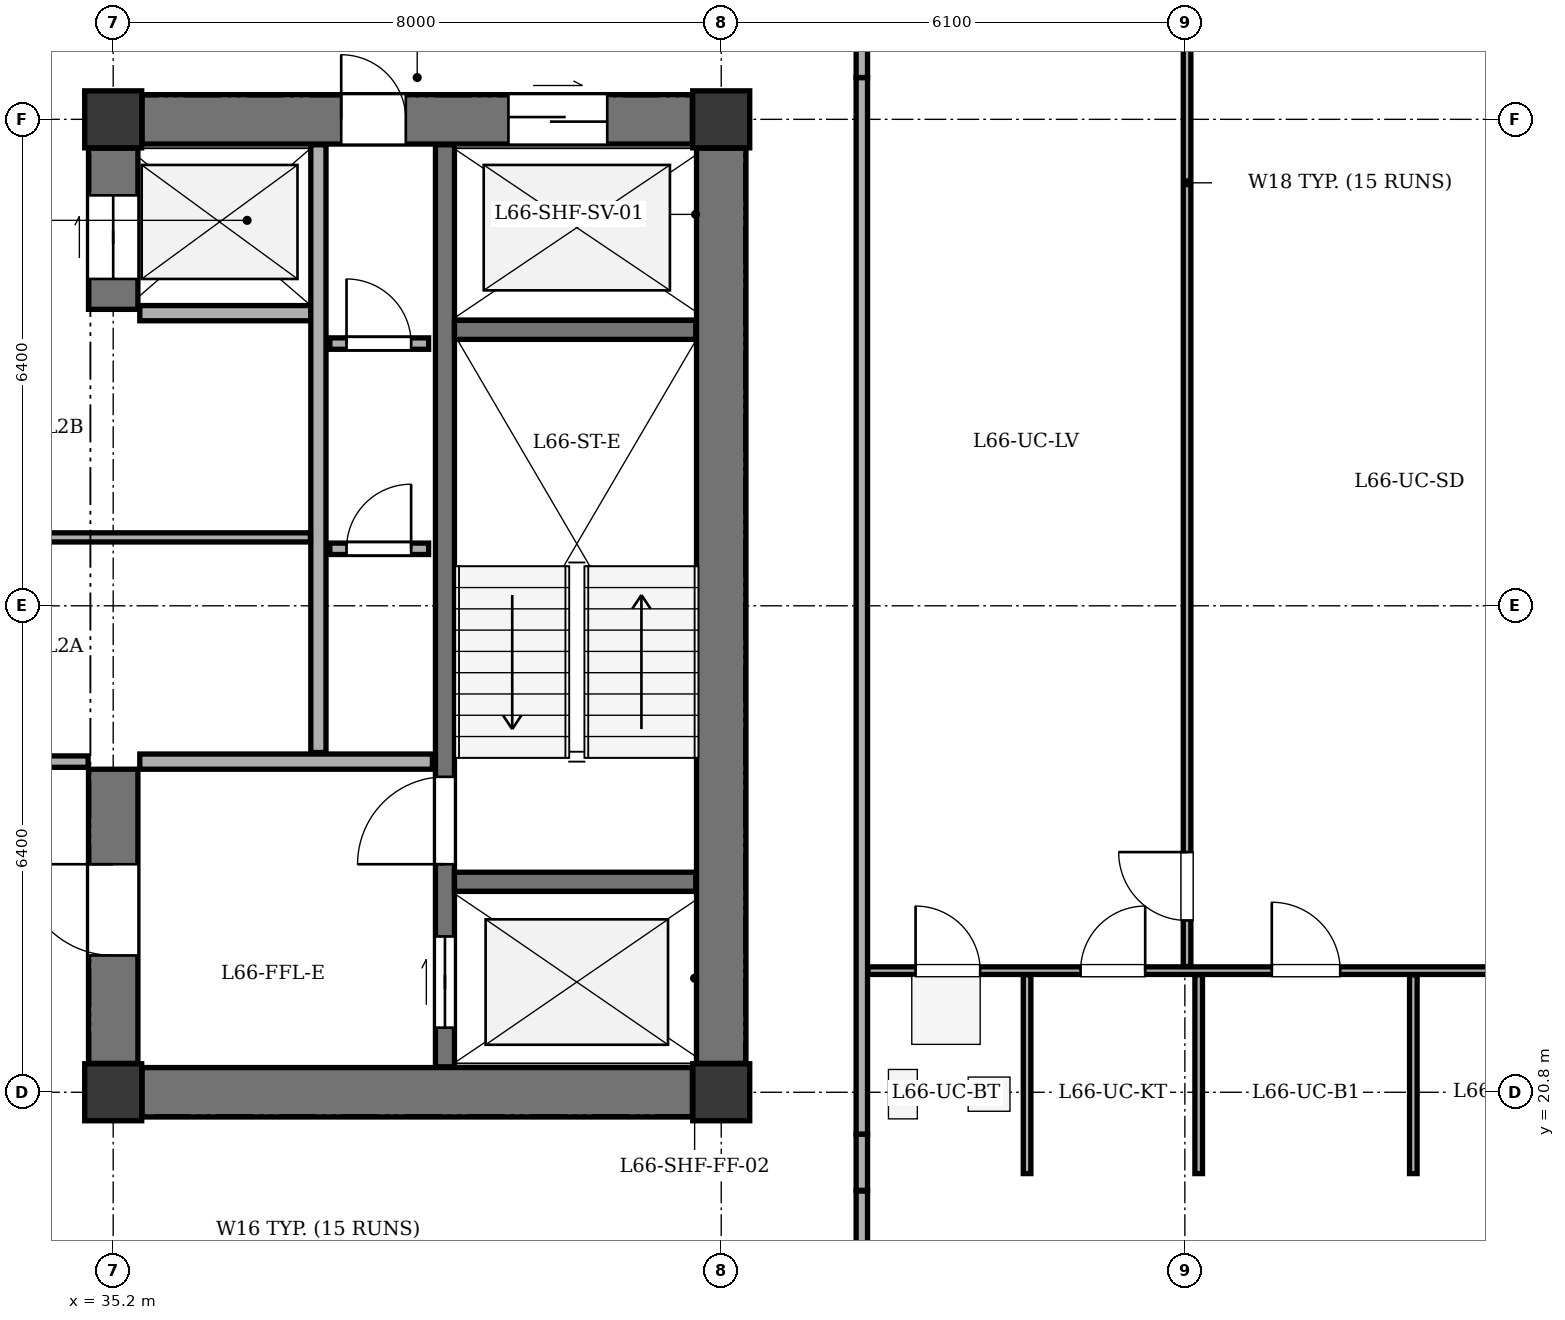
"""IFC4 building model, lengths in metres.
Left out: names, types, materials, properties, quantities, classifications, styles, units other than length and angle.
Written with IfcOpenShell. Run it as: python <this file> out.ifc"""

import sys

from ifc_helpers import new_model, si_unit, direction, frame, frame_2d, origin, origin_2d, place, context, subcontext, project, spatial, rectangle, extrude, element, fill, save


model = new_model("IFC4")
c1 = context("Model", 3, precision=1e-05, world=origin(), true_north=direction((0.0, 1.0)))
c2 = subcontext(c1, "Body", "Model", "MODEL_VIEW")
j1 = project(units=[si_unit("LENGTHUNIT", "METRE"), si_unit("PLANEANGLEUNIT", "RADIAN")], contexts=[c1])
p1 = place(None, origin())
s1 = spatial("IfcSite", under=j1, at=p1, CompositionType="ELEMENT")
p2 = place(p1, origin())
s2 = spatial("IfcBuilding", under=s1, at=p2, CompositionType="ELEMENT")
p3 = place(p2, frame((0.0, 0.0, 251.7)))
s3 = spatial("IfcBuildingStorey", under=s2, at=p3, CompositionType="ELEMENT", Elevation=251.7)
for number, where, z_axis, x_axis in (
    (1, (35.2, 20.8, 0.0), (0.0, 0.0, 1.0), (1.0, 0.0, 0.0)),
    (2, (43.2, 20.8, 0.0), (0.0, 0.0, 1.0), (1.0, 0.0, 0.0)),
    (3, (35.2, 33.6, 0.0), (0.0, 0.0, 1.0), (1.0, 0.0, 0.0)),
    (4, (43.2, 33.6, 0.0), (0.0, 0.0, 1.0), (1.0, 0.0, 0.0)),
):
    element("IfcColumn", number, at=place(p3, frame(where, z_axis=z_axis, x_axis=x_axis)), inside=s3, PredefinedType="COLUMN", context=c2, shape_type="SweptSolid", body=[
        extrude(rectangle(XDim=0.75, YDim=0.75, at=origin_2d()), origin(), (0.0, 0.0, 1.0), 3.4),
    ])
p4 = place(p3, frame((55.52, 19.85, 0.0), z_axis=(0.0, 0.0, 1.0), x_axis=(-0.707106781187, -0.707106781187, 0.0)))
e5 = element("IfcWall", 5, at=p4, inside=s3, PredefinedType="STANDARD", context=c2, shape_type="SweptSolid", body=[
    extrude(rectangle(XDim=5.402, YDim=0.32, at=frame_2d((2.701, 0.0))), origin(), (0.0, 0.0, 1.0), 2.725),
])
p5 = place(p4, frame((2.001, 0.0, 0.75)))
e6 = element("IfcOpeningElement", 6, at=p5, cuts=e5, PredefinedType="OPENING", context=c2, shape_type="SweptSolid", body=[
    extrude(rectangle(XDim=1.4, YDim=1.65, at=frame_2d((0.7, 0.825))), frame((0.0, 0.17, 0.0), z_axis=(0.0, -1.0, 0.0), x_axis=(1.0, 0.0, 0.0)), (0.0, 0.0, 1.0), 0.34),
])
p6 = place(p3, frame((43.2, 21.18, 0.0), z_axis=(0.0, 0.0, 1.0), x_axis=(0.0, 1.0, 0.0)))
e7 = element("IfcWall", 7, at=p6, inside=s3, PredefinedType="SHEAR", context=c2, shape_type="SweptSolid", body=[
    extrude(rectangle(XDim=12.04, YDim=0.65, at=frame_2d((6.02, 0.0))), origin(), (0.0, 0.0, 1.0), 3.1),
])
p7 = place(p3, frame((35.58, 20.8, 0.0), z_axis=(0.0, 0.0, 1.0), x_axis=(1.0, 0.0, 0.0)))
e8 = element("IfcWall", 8, at=p7, inside=s3, PredefinedType="SHEAR", context=c2, shape_type="SweptSolid", body=[
    extrude(rectangle(XDim=7.24, YDim=0.65, at=frame_2d((3.62, 0.0))), origin(), (0.0, 0.0, 1.0), 3.1),
])
p8 = place(p3, frame((35.58, 33.6, 0.0), z_axis=(0.0, 0.0, 1.0), x_axis=(1.0, 0.0, 0.0)))
e9 = element("IfcWall", 9, at=p8, inside=s3, PredefinedType="SHEAR", context=c2, shape_type="SweptSolid", body=[
    extrude(rectangle(XDim=7.24, YDim=0.65, at=frame_2d((3.62, 0.0))), origin(), (0.0, 0.0, 1.0), 3.1),
])
p9 = place(p8, frame((4.82, 0.0, 0.0)))
e10 = element("IfcOpeningElement", 10, at=p9, cuts=e9, PredefinedType="OPENING", context=c2, shape_type="SweptSolid", body=[
    extrude(rectangle(XDim=1.3, YDim=2.15, at=frame_2d((0.65, 1.075))), frame((0.0, 0.335, 0.0), z_axis=(0.0, -1.0, 0.0), x_axis=(1.0, 0.0, 0.0)), (0.0, 0.0, 1.0), 0.67),
])
p10 = place(p8, frame((2.62, 0.0, 0.0)))
e11 = element("IfcOpeningElement", 11, at=p10, cuts=e9, PredefinedType="OPENING", context=c2, shape_type="SweptSolid", body=[
    extrude(rectangle(XDim=0.85, YDim=2.02, at=frame_2d((0.425, 1.01))), frame((0.0, 0.335, 0.0), z_axis=(0.0, -1.0, 0.0), x_axis=(1.0, 0.0, 0.0)), (0.0, 0.0, 1.0), 0.67),
])
p11 = place(p3, frame((35.2, 21.18, 0.0), z_axis=(0.0, 0.0, 1.0), x_axis=(0.0, 1.0, 0.0)))
e12 = element("IfcWall", 12, at=p11, inside=s3, PredefinedType="SHEAR", context=c2, shape_type="SweptSolid", body=[
    extrude(rectangle(XDim=3.87, YDim=0.65, at=frame_2d((1.935, 0.0))), origin(), (0.0, 0.0, 1.0), 3.1),
])
p12 = place(p11, frame((1.42, 0.0, 0.0)))
e13 = element("IfcOpeningElement", 13, at=p12, cuts=e12, PredefinedType="OPENING", context=c2, shape_type="SweptSolid", body=[
    extrude(rectangle(XDim=1.2, YDim=2.15, at=frame_2d((0.6, 1.075))), frame((0.0, 0.335, 0.0), z_axis=(0.0, -1.0, 0.0), x_axis=(1.0, 0.0, 0.0)), (0.0, 0.0, 1.0), 0.67),
])
p13 = place(p3, frame((35.2, 31.1, 0.0), z_axis=(0.0, 0.0, 1.0), x_axis=(0.0, 1.0, 0.0)))
e14 = element("IfcWall", 14, at=p13, inside=s3, PredefinedType="SHEAR", context=c2, shape_type="SweptSolid", body=[
    extrude(rectangle(XDim=2.12, YDim=0.65, at=frame_2d((1.06, 0.0))), origin(), (0.0, 0.0, 1.0), 3.1),
])
p14 = place(p13, frame((0.4, 0.0, 0.0)))
e15 = element("IfcOpeningElement", 15, at=p14, cuts=e14, PredefinedType="OPENING", context=c2, shape_type="SweptSolid", body=[
    extrude(rectangle(XDim=1.1, YDim=2.1, at=frame_2d((0.55, 1.05))), frame((0.0, 0.335, 0.0), z_axis=(0.0, -1.0, 0.0), x_axis=(1.0, 0.0, 0.0)), (0.0, 0.0, 1.0), 0.67),
])
p15 = place(p3, frame((39.565, 21.135, 0.0), z_axis=(0.0, 0.0, 1.0), x_axis=(0.0, 1.0, 0.0)))
e16 = element("IfcWall", 16, at=p15, inside=s3, PredefinedType="SHEAR", context=c2, shape_type="SweptSolid", body=[
    extrude(rectangle(XDim=12.13, YDim=0.25, at=frame_2d((6.065, 0.0))), origin(), (0.0, 0.0, 1.0), 3.1),
])
p16 = place(p15, frame((0.515, 0.0, 0.0)))
e17 = element("IfcOpeningElement", 17, at=p16, cuts=e16, PredefinedType="OPENING", context=c2, shape_type="SweptSolid", body=[
    extrude(rectangle(XDim=1.2, YDim=2.15, at=frame_2d((0.6, 1.075))), frame((0.0, 0.135, 0.0), z_axis=(0.0, -1.0, 0.0), x_axis=(1.0, 0.0, 0.0)), (0.0, 0.0, 1.0), 0.27),
])
p17 = place(p15, frame((2.665, 0.0, 0.0)))
e18 = element("IfcOpeningElement", 18, at=p17, cuts=e16, PredefinedType="OPENING", context=c2, shape_type="SweptSolid", body=[
    extrude(rectangle(XDim=1.15, YDim=2.15, at=frame_2d((0.575, 1.075))), frame((0.0, 0.135, 0.0), z_axis=(0.0, -1.0, 0.0), x_axis=(1.0, 0.0, 0.0)), (0.0, 0.0, 1.0), 0.27),
])
for number, where, z_axis, x_axis in (
    (19, (39.69, 23.57, 0.0), (0.0, 0.0, 1.0), (1.0, 0.0, 0.0)),
    (20, (39.69, 30.83, 0.0), (0.0, 0.0, 1.0), (1.0, 0.0, 0.0)),
):
    element("IfcWall", number, at=place(p3, frame(where, z_axis=z_axis, x_axis=x_axis)), inside=s3, PredefinedType="SHEAR", context=c2, shape_type="SweptSolid", body=[
        extrude(rectangle(XDim=3.175, YDim=0.25, at=frame_2d((1.587, 0.0))), origin(), (0.0, 0.0, 1.0), 3.1),
    ])
p18 = place(p3, frame((35.55, 25.15, 0.0), z_axis=(0.0, 0.0, 1.0), x_axis=(1.0, 0.0, 0.0)))
e21 = element("IfcWall", 21, at=p18, inside=s3, PredefinedType="SOLIDWALL", context=c2, shape_type="SweptSolid", body=[
    extrude(rectangle(XDim=3.85, YDim=0.2, at=frame_2d((1.925, 0.0))), origin(), (0.0, 0.0, 1.0), 3.1),
])
p19 = place(p3, frame((35.55, 31.05, 0.0), z_axis=(0.0, 0.0, 1.0), x_axis=(1.0, 0.0, 0.0)))
e22 = element("IfcWall", 22, at=p19, inside=s3, PredefinedType="SOLIDWALL", context=c2, shape_type="SweptSolid", body=[
    extrude(rectangle(XDim=2.25, YDim=0.2, at=frame_2d((1.125, 0.0))), origin(), (0.0, 0.0, 1.0), 3.1),
])
p20 = place(p3, frame((37.9, 25.27, 0.0), z_axis=(0.0, 0.0, 1.0), x_axis=(0.0, 1.0, 0.0)))
e23 = element("IfcWall", 23, at=p20, inside=s3, PredefinedType="SOLIDWALL", context=c2, shape_type="SweptSolid", body=[
    extrude(rectangle(XDim=7.995, YDim=0.2, at=frame_2d((3.998, 0.0))), origin(), (0.0, 0.0, 1.0), 3.1),
])
p21 = place(p3, frame((38.05, 27.95, 0.0), z_axis=(0.0, 0.0, 1.0), x_axis=(1.0, 0.0, 0.0)))
e24 = element("IfcWall", 24, at=p21, inside=s3, PredefinedType="PARTITIONING", context=c2, shape_type="SweptSolid", body=[
    extrude(rectangle(XDim=1.3, YDim=0.15, at=frame_2d((0.65, 0.0))), origin(), (0.0, 0.0, 1.0), 3.1),
])
p22 = place(p21, frame((0.22, 0.0, 0.0)))
e25 = element("IfcOpeningElement", 25, at=p22, cuts=e24, PredefinedType="OPENING", context=c2, shape_type="SweptSolid", body=[
    extrude(rectangle(XDim=0.85, YDim=2.02, at=frame_2d((0.425, 1.01))), frame((0.0, 0.085, 0.0), z_axis=(0.0, -1.0, 0.0), x_axis=(1.0, 0.0, 0.0)), (0.0, 0.0, 1.0), 0.17),
])
p23 = place(p3, frame((38.05, 30.65, 0.0), z_axis=(0.0, 0.0, 1.0), x_axis=(1.0, 0.0, 0.0)))
e26 = element("IfcWall", 26, at=p23, inside=s3, PredefinedType="PARTITIONING", context=c2, shape_type="SweptSolid", body=[
    extrude(rectangle(XDim=1.3, YDim=0.15, at=frame_2d((0.65, 0.0))), origin(), (0.0, 0.0, 1.0), 3.1),
])
p24 = place(p23, frame((0.22, 0.0, 0.0)))
e27 = element("IfcOpeningElement", 27, at=p24, cuts=e26, PredefinedType="OPENING", context=c2, shape_type="SweptSolid", body=[
    extrude(rectangle(XDim=0.85, YDim=2.02, at=frame_2d((0.425, 1.01))), frame((0.0, 0.085, 0.0), z_axis=(0.0, -1.0, 0.0), x_axis=(1.0, 0.0, 0.0)), (0.0, 0.0, 1.0), 0.17),
])
p25 = place(p3, frame((29.35, 25.15, 0.0), z_axis=(0.0, 0.0, 1.0), x_axis=(1.0, 0.0, 0.0)))
e28 = element("IfcWall", 28, at=p25, inside=s3, PredefinedType="PARTITIONING", context=c2, shape_type="SweptSolid", body=[
    extrude(rectangle(XDim=5.52, YDim=0.15, at=frame_2d((2.76, 0.0))), origin(), (0.0, 0.0, 1.0), 3.1),
])
p26 = place(p3, frame((29.45, 28.1, 0.0), z_axis=(0.0, 0.0, 1.0), x_axis=(1.0, 0.0, 0.0)))
e29 = element("IfcWall", 29, at=p26, inside=s3, PredefinedType="PARTITIONING", context=c2, shape_type="SweptSolid", body=[
    extrude(rectangle(XDim=8.345, YDim=0.12, at=frame_2d((4.172, 0.0))), origin(), (0.0, 0.0, 1.0), 3.1),
])
p27 = place(p3, frame((45.05, 19.5, 0.0), z_axis=(0.0, 0.0, 1.0), x_axis=(0.0, -1.0, 0.0)))
e30 = element("IfcWall", 30, at=p27, inside=s3, PredefinedType="PARTITIONING", context=c2, shape_type="SweptSolid", body=[
    extrude(rectangle(XDim=0.96, YDim=0.15, at=frame_2d((0.48, 0.0))), origin(), (0.0, 0.0, 1.0), 2.725),
])
p28 = place(p3, frame((45.05, 19.51, 0.0), z_axis=(0.0, 0.0, 1.0), x_axis=(0.0, 1.0, 0.0)))
e31 = element("IfcWall", 31, at=p28, inside=s3, PredefinedType="PARTITIONING", context=c2, shape_type="SweptSolid", body=[
    extrude(rectangle(XDim=0.74, YDim=0.15, at=frame_2d((0.37, 0.0))), origin(), (0.0, 0.0, 1.0), 2.725),
])
p29 = place(p3, frame((45.05, 20.25, 0.0), z_axis=(0.0, 0.0, 1.0), x_axis=(0.0, 1.0, 0.0)))
e32 = element("IfcWall", 32, at=p29, inside=s3, PredefinedType="PARTITIONING", context=c2, shape_type="SweptSolid", body=[
    extrude(rectangle(XDim=13.9, YDim=0.15, at=frame_2d((6.95, 0.0))), origin(), (0.0, 0.0, 1.0), 2.725),
])
p30 = place(p3, frame((45.05, 34.15, 0.0), z_axis=(0.0, 0.0, 1.0), x_axis=(0.0, 1.0, 0.0)))
e33 = element("IfcWall", 33, at=p30, inside=s3, PredefinedType="PARTITIONING", context=c2, shape_type="SweptSolid", body=[
    extrude(rectangle(XDim=1.79, YDim=0.15, at=frame_2d((0.895, 0.0))), origin(), (0.0, 0.0, 1.0), 2.725),
])
p31 = place(p30, frame((0.58, 0.0, 0.0)))
e34 = element("IfcOpeningElement", 34, at=p31, cuts=e33, PredefinedType="OPENING", context=c2, shape_type="SweptSolid", body=[
    extrude(rectangle(XDim=1.0, YDim=2.1, at=frame_2d((0.5, 1.05))), frame((0.0, 0.085, 0.0), z_axis=(0.0, -1.0, 0.0), x_axis=(1.0, 0.0, 0.0)), (0.0, 0.0, 1.0), 0.17),
])
p32 = place(p3, frame((45.13, 22.4, 0.0), z_axis=(0.0, 0.0, 1.0), x_axis=(1.0, 0.0, 0.0)))
e35 = element("IfcWall", 35, at=p32, inside=s3, PredefinedType="PARTITIONING", context=c2, shape_type="SweptSolid", body=[
    extrude(rectangle(XDim=10.225, YDim=0.1, at=frame_2d((5.113, 0.0))), origin(), (0.0, 0.0, 1.0), 3.1),
])
p33 = place(p32, frame((0.627, 0.0, 0.0)))
e36 = element("IfcOpeningElement", 36, at=p33, cuts=e35, PredefinedType="OPENING", context=c2, shape_type="SweptSolid", body=[
    extrude(rectangle(XDim=0.85, YDim=2.05, at=frame_2d((0.425, 1.025))), frame((0.0, 0.06, 0.0), z_axis=(0.0, -1.0, 0.0), x_axis=(1.0, 0.0, 0.0)), (0.0, 0.0, 1.0), 0.12),
])
p34 = place(p32, frame((2.798, 0.0, 0.0)))
e37 = element("IfcOpeningElement", 37, at=p34, cuts=e35, PredefinedType="OPENING", context=c2, shape_type="SweptSolid", body=[
    extrude(rectangle(XDim=0.85, YDim=2.05, at=frame_2d((0.425, 1.025))), frame((0.0, 0.06, 0.0), z_axis=(0.0, -1.0, 0.0), x_axis=(1.0, 0.0, 0.0)), (0.0, 0.0, 1.0), 0.12),
])
p35 = place(p32, frame((5.314, 0.0, 0.0)))
e38 = element("IfcOpeningElement", 38, at=p35, cuts=e35, PredefinedType="OPENING", context=c2, shape_type="SweptSolid", body=[
    extrude(rectangle(XDim=0.9, YDim=2.05, at=frame_2d((0.45, 1.025))), frame((0.0, 0.06, 0.0), z_axis=(0.0, -1.0, 0.0), x_axis=(1.0, 0.0, 0.0)), (0.0, 0.0, 1.0), 0.12),
])
p36 = place(p32, frame((8.138, 0.0, 0.0)))
e39 = element("IfcOpeningElement", 39, at=p36, cuts=e35, PredefinedType="OPENING", context=c2, shape_type="SweptSolid", body=[
    extrude(rectangle(XDim=0.9, YDim=2.05, at=frame_2d((0.45, 1.025))), frame((0.0, 0.06, 0.0), z_axis=(0.0, -1.0, 0.0), x_axis=(1.0, 0.0, 0.0)), (0.0, 0.0, 1.0), 0.12),
])
p37 = place(p3, frame((49.329, 22.455, 0.0), z_axis=(0.0, 0.0, 1.0), x_axis=(0.0, 1.0, 0.0)))
e40 = element("IfcWall", 40, at=p37, inside=s3, PredefinedType="PARTITIONING", context=c2, shape_type="SweptSolid", body=[
    extrude(rectangle(XDim=18.765, YDim=0.1, at=frame_2d((9.382, 0.0))), origin(), (0.0, 0.0, 1.0), 2.725),
])
p38 = place(p37, frame((0.605, 0.0, 0.0)))
e41 = element("IfcOpeningElement", 41, at=p38, cuts=e40, PredefinedType="OPENING", context=c2, shape_type="SweptSolid", body=[
    extrude(rectangle(XDim=0.9, YDim=2.05, at=frame_2d((0.45, 1.025))), frame((0.0, 0.06, 0.0), z_axis=(0.0, -1.0, 0.0), x_axis=(1.0, 0.0, 0.0)), (0.0, 0.0, 1.0), 0.12),
])
for number, where, z_axis, x_axis in (
    (42, (47.224, 19.73, 0.0), (0.0, 0.0, 1.0), (0.0, 1.0, 0.0)),
    (43, (49.482, 19.73, 0.0), (0.0, 0.0, 1.0), (0.0, 1.0, 0.0)),
):
    element("IfcWall", number, at=place(p3, frame(where, z_axis=z_axis, x_axis=x_axis)), inside=s3, PredefinedType="PARTITIONING", context=c2, shape_type="SweptSolid", body=[
        extrude(rectangle(XDim=2.615, YDim=0.1, at=frame_2d((1.308, 0.0))), origin(), (0.0, 0.0, 1.0), 2.725),
    ])
p39 = place(p3, frame((52.306, 19.73, 0.0), z_axis=(0.0, 0.0, 1.0), x_axis=(0.0, 1.0, 0.0)))
e44 = element("IfcWall", 44, at=p39, inside=s3, PredefinedType="PARTITIONING", context=c2, shape_type="SweptSolid", body=[
    extrude(rectangle(XDim=2.615, YDim=0.1, at=frame_2d((1.308, 0.0))), origin(), (0.0, 0.0, 1.0), 3.1),
])
p40 = place(p9, origin())
e45 = element("IfcDoor", 45, at=p40, inside=s3, OperationType="DOUBLE_DOOR_SLIDING", PredefinedType="DOOR", context=c2, shape_type="SweptSolid", body=[
    extrude(rectangle(XDim=1.3, YDim=2.15, at=frame_2d((0.65, 1.075))), frame((0.0, 0.025, 0.0), z_axis=(0.0, -1.0, 0.0), x_axis=(1.0, 0.0, 0.0)), (0.0, 0.0, 1.0), 0.05),
])
fill(e10, e45)
p41 = place(p10, origin())
e46 = element("IfcDoor", 46, at=p41, inside=s3, OperationType="SINGLE_SWING_LEFT", PredefinedType="DOOR", context=c2, shape_type="SweptSolid", body=[
    extrude(rectangle(XDim=0.85, YDim=2.02, at=frame_2d((0.425, 1.01))), frame((0.0, 0.025, 0.0), z_axis=(0.0, -1.0, 0.0), x_axis=(1.0, 0.0, 0.0)), (0.0, 0.0, 1.0), 0.05),
])
fill(e11, e46)
p42 = place(p12, origin())
e47 = element("IfcDoor", 47, at=p42, inside=s3, OperationType="SINGLE_SWING_RIGHT", PredefinedType="DOOR", context=c2, shape_type="SweptSolid", body=[
    extrude(rectangle(XDim=1.2, YDim=2.15, at=frame_2d((0.6, 1.075))), frame((0.0, 0.025, 0.0), z_axis=(0.0, -1.0, 0.0), x_axis=(1.0, 0.0, 0.0)), (0.0, 0.0, 1.0), 0.05),
])
fill(e13, e47)
p43 = place(p14, origin())
e48 = element("IfcDoor", 48, at=p43, inside=s3, OperationType="DOUBLE_DOOR_SLIDING", PredefinedType="DOOR", context=c2, shape_type="SweptSolid", body=[
    extrude(rectangle(XDim=1.1, YDim=2.1, at=frame_2d((0.55, 1.05))), frame((0.0, 0.025, 0.0), z_axis=(0.0, -1.0, 0.0), x_axis=(1.0, 0.0, 0.0)), (0.0, 0.0, 1.0), 0.05),
])
fill(e15, e48)
p44 = place(p16, origin())
e49 = element("IfcDoor", 49, at=p44, inside=s3, OperationType="DOUBLE_DOOR_SLIDING", PredefinedType="DOOR", context=c2, shape_type="SweptSolid", body=[
    extrude(rectangle(XDim=1.2, YDim=2.15, at=frame_2d((0.6, 1.075))), frame((0.0, 0.025, 0.0), z_axis=(0.0, -1.0, 0.0), x_axis=(1.0, 0.0, 0.0)), (0.0, 0.0, 1.0), 0.05),
])
fill(e17, e49)
p45 = place(p17, origin())
e50 = element("IfcDoor", 50, at=p45, inside=s3, OperationType="SINGLE_SWING_LEFT", PredefinedType="DOOR", context=c2, shape_type="SweptSolid", body=[
    extrude(rectangle(XDim=1.15, YDim=2.15, at=frame_2d((0.575, 1.075))), frame((0.0, 0.025, 0.0), z_axis=(0.0, -1.0, 0.0), x_axis=(1.0, 0.0, 0.0)), (0.0, 0.0, 1.0), 0.05),
])
fill(e18, e50)
p46 = place(p22, origin())
e51 = element("IfcDoor", 51, at=p46, inside=s3, OperationType="SINGLE_SWING_RIGHT", PredefinedType="DOOR", context=c2, shape_type="SweptSolid", body=[
    extrude(rectangle(XDim=0.85, YDim=2.02, at=frame_2d((0.425, 1.01))), frame((0.0, 0.025, 0.0), z_axis=(0.0, -1.0, 0.0), x_axis=(1.0, 0.0, 0.0)), (0.0, 0.0, 1.0), 0.05),
])
fill(e25, e51)
p47 = place(p24, origin())
e52 = element("IfcDoor", 52, at=p47, inside=s3, OperationType="SINGLE_SWING_LEFT", PredefinedType="DOOR", context=c2, shape_type="SweptSolid", body=[
    extrude(rectangle(XDim=0.85, YDim=2.02, at=frame_2d((0.425, 1.01))), frame((0.0, 0.025, 0.0), z_axis=(0.0, -1.0, 0.0), x_axis=(1.0, 0.0, 0.0)), (0.0, 0.0, 1.0), 0.05),
])
fill(e27, e52)
p48 = place(p38, origin())
e53 = element("IfcDoor", 53, at=p48, inside=s3, OperationType="SINGLE_SWING_RIGHT", PredefinedType="DOOR", context=c2, shape_type="SweptSolid", body=[
    extrude(rectangle(XDim=0.9, YDim=2.05, at=frame_2d((0.45, 1.025))), frame((0.0, 0.025, 0.0), z_axis=(0.0, -1.0, 0.0), x_axis=(1.0, 0.0, 0.0)), (0.0, 0.0, 1.0), 0.05),
])
fill(e41, e53)
p49 = place(p33, origin())
e54 = element("IfcDoor", 54, at=p49, inside=s3, OperationType="SINGLE_SWING_LEFT", PredefinedType="DOOR", context=c2, shape_type="SweptSolid", body=[
    extrude(rectangle(XDim=0.85, YDim=2.05, at=frame_2d((0.425, 1.025))), frame((0.0, 0.025, 0.0), z_axis=(0.0, -1.0, 0.0), x_axis=(1.0, 0.0, 0.0)), (0.0, 0.0, 1.0), 0.05),
])
fill(e36, e54)
p50 = place(p34, origin())
e55 = element("IfcDoor", 55, at=p50, inside=s3, OperationType="SINGLE_SWING_RIGHT", PredefinedType="DOOR", context=c2, shape_type="SweptSolid", body=[
    extrude(rectangle(XDim=0.85, YDim=2.05, at=frame_2d((0.425, 1.025))), frame((0.0, 0.025, 0.0), z_axis=(0.0, -1.0, 0.0), x_axis=(1.0, 0.0, 0.0)), (0.0, 0.0, 1.0), 0.05),
])
fill(e37, e55)
p51 = place(p35, origin())
e56 = element("IfcDoor", 56, at=p51, inside=s3, OperationType="SINGLE_SWING_LEFT", PredefinedType="DOOR", context=c2, shape_type="SweptSolid", body=[
    extrude(rectangle(XDim=0.9, YDim=2.05, at=frame_2d((0.45, 1.025))), frame((0.0, 0.025, 0.0), z_axis=(0.0, -1.0, 0.0), x_axis=(1.0, 0.0, 0.0)), (0.0, 0.0, 1.0), 0.05),
])
fill(e38, e56)
save(model, sys.argv[1])
